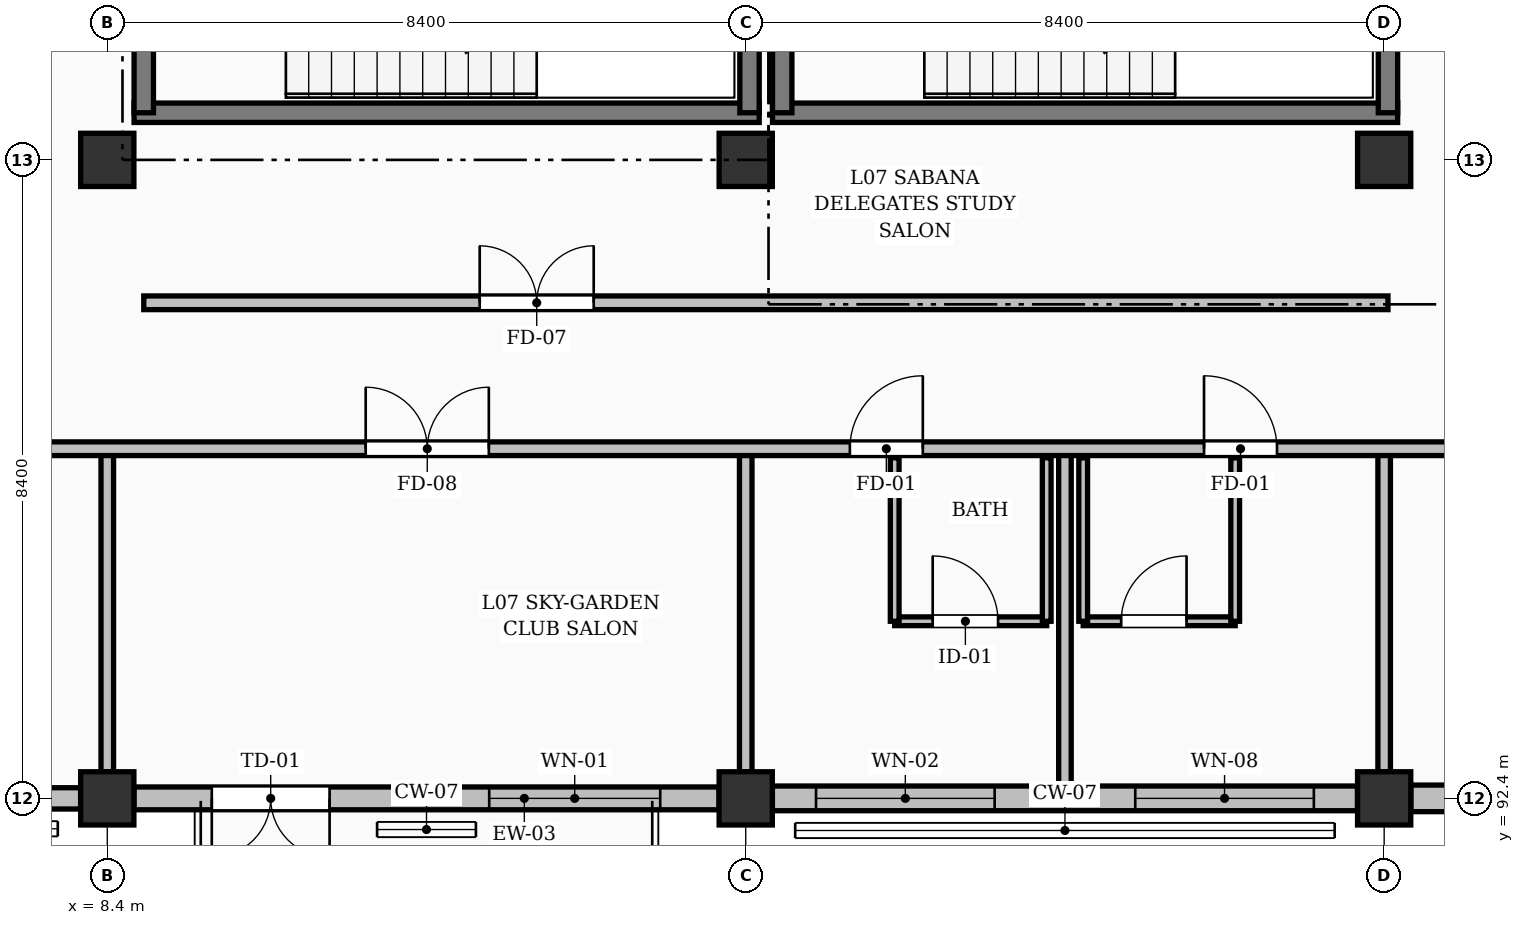
"""IFC4 building model, lengths in metres.
Left out: names, types, materials, properties, quantities, classifications, styles, units other than length and angle.
Written with IfcOpenShell. Run it as: python <this file> out.ifc"""

import sys

from ifc_helpers import new_model, si_unit, direction, frame, frame_2d, origin, origin_2d, place, context, subcontext, project, spatial, rectangle, extrude, element, fill, save


model = new_model("IFC4")
c1 = context("Model", 3, precision=1e-05, world=origin(), true_north=direction((0.0, 1.0)))
c2 = subcontext(c1, "Body", "Model", "MODEL_VIEW")
j1 = project(units=[si_unit("LENGTHUNIT", "METRE"), si_unit("PLANEANGLEUNIT", "RADIAN")], contexts=[c1])
p1 = place(None, origin())
s1 = spatial("IfcSite", under=j1, at=p1, CompositionType="ELEMENT")
p2 = place(p1, origin())
s2 = spatial("IfcBuilding", under=s1, at=p2, CompositionType="ELEMENT")
p3 = place(p2, frame((0.0, 0.0, 25.2)))
s3 = spatial("IfcBuildingStorey", under=s2, at=p3, CompositionType="ELEMENT", Elevation=25.2)
for number, where, z_axis, x_axis in (
    (1, (8.4, 92.4, 0.0), (0.0, 0.0, 1.0), (1.0, 0.0, 0.0)),
    (2, (8.4, 100.8, 0.0), (0.0, 0.0, 1.0), (1.0, 0.0, 0.0)),
    (3, (16.8, 92.4, 0.0), (0.0, 0.0, 1.0), (1.0, 0.0, 0.0)),
    (4, (16.8, 100.8, 0.0), (0.0, 0.0, 1.0), (1.0, 0.0, 0.0)),
    (5, (25.2, 92.4, 0.0), (0.0, 0.0, 1.0), (1.0, 0.0, 0.0)),
    (6, (25.2, 100.8, 0.0), (0.0, 0.0, 1.0), (1.0, 0.0, 0.0)),
):
    element("IfcColumn", number, at=place(p3, frame(where, z_axis=z_axis, x_axis=x_axis)), inside=s3, PredefinedType="COLUMN", context=c2, shape_type="SweptSolid", body=[
        extrude(rectangle(XDim=0.7, YDim=0.7, at=origin_2d()), origin(), (0.0, 0.0, 1.0), 3.36),
    ])
p4 = place(p3, frame((0.351, 92.4, 0.0), z_axis=(0.0, 0.0, 1.0), x_axis=(1.0, 0.0, 0.0)))
e7 = element("IfcWall", 7, at=p4, inside=s3, PredefinedType="SOLIDWALL", context=c2, shape_type="SweptSolid", body=[
    extrude(rectangle(XDim=7.698, YDim=0.28, at=frame_2d((3.849, 0.0))), origin(), (0.0, 0.0, 1.0), 2.414),
])
p5 = place(p4, frame((0.574, 0.0, 0.25)))
e8 = element("IfcOpeningElement", 8, at=p5, cuts=e7, PredefinedType="OPENING", context=c2, shape_type="SweptSolid", body=[
    extrude(rectangle(XDim=2.35, YDim=1.85, at=frame_2d((1.175, 0.925))), frame((0.0, 0.15, 0.0), z_axis=(0.0, -1.0, 0.0), x_axis=(1.0, 0.0, 0.0)), (0.0, 0.0, 1.0), 0.3),
])
p6 = place(p4, frame((4.774, 0.0, 0.25)))
e9 = element("IfcOpeningElement", 9, at=p6, cuts=e7, PredefinedType="OPENING", context=c2, shape_type="SweptSolid", body=[
    extrude(rectangle(XDim=2.35, YDim=1.95, at=frame_2d((1.175, 0.975))), frame((0.0, 0.15, 0.0), z_axis=(0.0, -1.0, 0.0), x_axis=(1.0, 0.0, 0.0)), (0.0, 0.0, 1.0), 0.3),
])
p7 = place(p3, frame((8.751, 92.4, 0.0), z_axis=(0.0, 0.0, 1.0), x_axis=(1.0, 0.0, 0.0)))
e10 = element("IfcWall", 10, at=p7, inside=s3, PredefinedType="SOLIDWALL", context=c2, shape_type="SweptSolid", body=[
    extrude(rectangle(XDim=7.698, YDim=0.3, at=frame_2d((3.849, 0.0))), origin(), (0.0, 0.0, 1.0), 2.494),
])
p8 = place(p7, frame((1.024, 0.0, 0.0)))
e11 = element("IfcOpeningElement", 11, at=p8, cuts=e10, PredefinedType="OPENING", context=c2, shape_type="SweptSolid", body=[
    extrude(rectangle(XDim=1.55, YDim=2.08, at=frame_2d((0.775, 1.04))), frame((0.0, 0.16, 0.0), z_axis=(0.0, -1.0, 0.0), x_axis=(1.0, 0.0, 0.0)), (0.0, 0.0, 1.0), 0.32),
])
p9 = place(p7, frame((4.674, 0.0, 0.25)))
e12 = element("IfcOpeningElement", 12, at=p9, cuts=e10, PredefinedType="OPENING", context=c2, shape_type="SweptSolid", body=[
    extrude(rectangle(XDim=2.25, YDim=1.85, at=frame_2d((1.125, 0.925))), frame((0.0, 0.16, 0.0), z_axis=(0.0, -1.0, 0.0), x_axis=(1.0, 0.0, 0.0)), (0.0, 0.0, 1.0), 0.32),
])
p10 = place(p3, frame((17.151, 92.4, 0.0), z_axis=(0.0, 0.0, 1.0), x_axis=(1.0, 0.0, 0.0)))
e13 = element("IfcWall", 13, at=p10, inside=s3, PredefinedType="SOLIDWALL", context=c2, shape_type="SweptSolid", body=[
    extrude(rectangle(XDim=7.698, YDim=0.325, at=frame_2d((3.849, 0.0))), origin(), (0.0, 0.0, 1.0), 2.494),
])
p11 = place(p10, frame((0.574, 0.0, 0.25)))
e14 = element("IfcOpeningElement", 14, at=p11, cuts=e13, PredefinedType="OPENING", context=c2, shape_type="SweptSolid", body=[
    extrude(rectangle(XDim=2.35, YDim=1.85, at=frame_2d((1.175, 0.925))), frame((0.0, 0.172, 0.0), z_axis=(0.0, -1.0, 0.0), x_axis=(1.0, 0.0, 0.0)), (0.0, 0.0, 1.0), 0.345),
])
p12 = place(p10, frame((4.774, 0.0, 0.25)))
e15 = element("IfcOpeningElement", 15, at=p12, cuts=e13, PredefinedType="OPENING", context=c2, shape_type="SweptSolid", body=[
    extrude(rectangle(XDim=2.35, YDim=1.95, at=frame_2d((1.175, 0.975))), frame((0.0, 0.172, 0.0), z_axis=(0.0, -1.0, 0.0), x_axis=(1.0, 0.0, 0.0)), (0.0, 0.0, 1.0), 0.345),
])
p13 = place(p3, frame((25.551, 92.4, 0.0), z_axis=(0.0, 0.0, 1.0), x_axis=(1.0, 0.0, 0.0)))
e16 = element("IfcWall", 16, at=p13, inside=s3, PredefinedType="SOLIDWALL", context=c2, shape_type="SweptSolid", body=[
    extrude(rectangle(XDim=7.698, YDim=0.35, at=frame_2d((3.849, 0.0))), origin(), (0.0, 0.0, 1.0), 2.494),
])
p14 = place(p13, frame((0.974, 0.0, 0.0)))
e17 = element("IfcOpeningElement", 17, at=p14, cuts=e16, PredefinedType="OPENING", context=c2, shape_type="SweptSolid", body=[
    extrude(rectangle(XDim=1.65, YDim=2.08, at=frame_2d((0.825, 1.04))), frame((0.0, 0.185, 0.0), z_axis=(0.0, -1.0, 0.0), x_axis=(1.0, 0.0, 0.0)), (0.0, 0.0, 1.0), 0.37),
])
p15 = place(p13, frame((4.624, 0.0, 0.25)))
e18 = element("IfcOpeningElement", 18, at=p15, cuts=e16, PredefinedType="OPENING", context=c2, shape_type="SweptSolid", body=[
    extrude(rectangle(XDim=2.35, YDim=1.95, at=frame_2d((1.175, 0.975))), frame((0.0, 0.185, 0.0), z_axis=(0.0, -1.0, 0.0), x_axis=(1.0, 0.0, 0.0)), (0.0, 0.0, 1.0), 0.37),
])
p16 = place(p3, frame((8.752, 101.42, 0.0), z_axis=(0.0, 0.0, 1.0), x_axis=(1.0, 0.0, 0.0)))
e19 = element("IfcWall", 19, at=p16, inside=s3, PredefinedType="SOLIDWALL", context=c2, shape_type="SweptSolid", body=[
    extrude(rectangle(XDim=8.225, YDim=0.255, at=frame_2d((4.113, 0.0))), origin(), (0.0, 0.0, 1.0), 3.12),
])
for number, where, z_axis, x_axis in (
    (20, (8.88, 101.42, 0.0), (0.0, 0.0, 1.0), (0.0, 1.0, 0.0)),
    (21, (16.85, 101.42, 0.0), (0.0, 0.0, 1.0), (0.0, 1.0, 0.0)),
):
    element("IfcWall", number, at=place(p3, frame(where, z_axis=z_axis, x_axis=x_axis)), inside=s3, PredefinedType="SOLIDWALL", context=c2, shape_type="SweptSolid", body=[
        extrude(rectangle(XDim=3.73, YDim=0.255, at=frame_2d((1.865, 0.0))), origin(), (0.0, 0.0, 1.0), 3.12),
    ])
p17 = place(p3, frame((17.153, 101.42, 0.0), z_axis=(0.0, 0.0, 1.0), x_axis=(1.0, 0.0, 0.0)))
e22 = element("IfcWall", 22, at=p17, inside=s3, PredefinedType="SOLIDWALL", context=c2, shape_type="SweptSolid", body=[
    extrude(rectangle(XDim=8.225, YDim=0.255, at=frame_2d((4.112, 0.0))), origin(), (0.0, 0.0, 1.0), 3.12),
])
for number, where, z_axis, x_axis in (
    (23, (17.28, 101.42, 0.0), (0.0, 0.0, 1.0), (0.0, 1.0, 0.0)),
    (24, (25.25, 101.42, 0.0), (0.0, 0.0, 1.0), (0.0, 1.0, 0.0)),
):
    element("IfcWall", number, at=place(p3, frame(where, z_axis=z_axis, x_axis=x_axis)), inside=s3, PredefinedType="SOLIDWALL", context=c2, shape_type="SweptSolid", body=[
        extrude(rectangle(XDim=3.73, YDim=0.255, at=frame_2d((1.865, 0.0))), origin(), (0.0, 0.0, 1.0), 3.12),
    ])
p18 = place(p3, frame((8.4, 92.75, 0.0), z_axis=(0.0, 0.0, 1.0), x_axis=(0.0, 1.0, 0.0)))
e25 = element("IfcWall", 25, at=p18, inside=s3, PredefinedType="PARTITIONING", context=c2, shape_type="SweptSolid", body=[
    extrude(rectangle(XDim=4.25, YDim=0.165, at=frame_2d((2.125, 0.0))), origin(), (0.0, 0.0, 1.0), 2.375),
])
p19 = place(p3, frame((18.76, 94.73, 0.0), z_axis=(0.0, 0.0, 1.0), x_axis=(1.0, 0.0, 0.0)))
e26 = element("IfcWall", 26, at=p19, inside=s3, PredefinedType="PARTITIONING", context=c2, shape_type="SweptSolid", body=[
    extrude(rectangle(XDim=2.0, YDim=0.115, at=frame_2d((1.0, 0.0))), origin(), (0.0, 0.0, 1.0), 3.12),
])
p20 = place(p19, frame((0.5, 0.0, 0.0)))
e27 = element("IfcOpeningElement", 27, at=p20, cuts=e26, PredefinedType="OPENING", context=c2, shape_type="SweptSolid", body=[
    extrude(rectangle(XDim=0.86, YDim=2.05, at=frame_2d((0.43, 1.025))), frame((0.0, 0.067, 0.0), z_axis=(0.0, -1.0, 0.0), x_axis=(1.0, 0.0, 0.0)), (0.0, 0.0, 1.0), 0.135),
])
for number, where, z_axis, x_axis in (
    (28, (18.76, 94.73, 0.0), (0.0, 0.0, 1.0), (0.0, 1.0, 0.0)),
    (29, (20.76, 94.73, 0.0), (0.0, 0.0, 1.0), (0.0, 1.0, 0.0)),
):
    element("IfcWall", number, at=place(p3, frame(where, z_axis=z_axis, x_axis=x_axis)), inside=s3, PredefinedType="PARTITIONING", context=c2, shape_type="SweptSolid", body=[
        extrude(rectangle(XDim=2.15, YDim=0.115, at=frame_2d((1.075, 0.0))), origin(), (0.0, 0.0, 1.0), 3.12),
    ])
p21 = place(p3, frame((21.24, 94.73, 0.0), z_axis=(0.0, 0.0, 1.0), x_axis=(1.0, 0.0, 0.0)))
e30 = element("IfcWall", 30, at=p21, inside=s3, PredefinedType="PARTITIONING", context=c2, shape_type="SweptSolid", body=[
    extrude(rectangle(XDim=2.0, YDim=0.115, at=frame_2d((1.0, 0.0))), origin(), (0.0, 0.0, 1.0), 3.12),
])
p22 = place(p21, frame((0.5, 0.0, 0.0)))
e31 = element("IfcOpeningElement", 31, at=p22, cuts=e30, PredefinedType="OPENING", context=c2, shape_type="SweptSolid", body=[
    extrude(rectangle(XDim=0.86, YDim=2.05, at=frame_2d((0.43, 1.025))), frame((0.0, 0.067, 0.0), z_axis=(0.0, -1.0, 0.0), x_axis=(1.0, 0.0, 0.0)), (0.0, 0.0, 1.0), 0.135),
])
for number, where, z_axis, x_axis in (
    (32, (21.24, 94.73, 0.0), (0.0, 0.0, 1.0), (0.0, 1.0, 0.0)),
    (33, (23.24, 94.73, 0.0), (0.0, 0.0, 1.0), (0.0, 1.0, 0.0)),
):
    element("IfcWall", number, at=place(p3, frame(where, z_axis=z_axis, x_axis=x_axis)), inside=s3, PredefinedType="PARTITIONING", context=c2, shape_type="SweptSolid", body=[
        extrude(rectangle(XDim=2.15, YDim=0.115, at=frame_2d((1.075, 0.0))), origin(), (0.0, 0.0, 1.0), 3.12),
    ])
p23 = place(p3, frame((21.0, 92.562, 0.0), z_axis=(0.0, 0.0, 1.0), x_axis=(0.0, 1.0, 0.0)))
e34 = element("IfcWall", 34, at=p23, inside=s3, PredefinedType="PARTITIONING", context=c2, shape_type="SweptSolid", body=[
    extrude(rectangle(XDim=4.438, YDim=0.165, at=frame_2d((2.219, 0.0))), origin(), (0.0, 0.0, 1.0), 3.12),
])
for number, where, z_axis, x_axis in (
    (35, (16.8, 92.75, 0.0), (0.0, 0.0, 1.0), (0.0, 1.0, 0.0)),
    (36, (25.2, 92.75, 0.0), (0.0, 0.0, 1.0), (0.0, 1.0, 0.0)),
):
    element("IfcWall", number, at=place(p3, frame(where, z_axis=z_axis, x_axis=x_axis)), inside=s3, PredefinedType="PARTITIONING", context=c2, shape_type="SweptSolid", body=[
        extrude(rectangle(XDim=4.25, YDim=0.165, at=frame_2d((2.125, 0.0))), origin(), (0.0, 0.0, 1.0), 2.455),
    ])
p24 = place(p3, frame((0.14, 97.0, 0.0), z_axis=(0.0, 0.0, 1.0), x_axis=(1.0, 0.0, 0.0)))
e37 = element("IfcWall", 37, at=p24, inside=s3, PredefinedType="PARTITIONING", context=c2, shape_type="SweptSolid", body=[
    extrude(rectangle(XDim=50.26, YDim=0.18, at=frame_2d((25.13, 0.0))), origin(), (0.0, 0.0, 1.0), 3.12),
])
p25 = place(p24, frame((1.23, 0.0, 0.0)))
e38 = element("IfcOpeningElement", 38, at=p25, cuts=e37, PredefinedType="OPENING", context=c2, shape_type="SweptSolid", body=[
    extrude(rectangle(XDim=0.96, YDim=2.15, at=frame_2d((0.48, 1.075))), frame((0.0, 0.1, 0.0), z_axis=(0.0, -1.0, 0.0), x_axis=(1.0, 0.0, 0.0)), (0.0, 0.0, 1.0), 0.2),
])
p26 = place(p24, frame((5.89, 0.0, 0.0)))
e39 = element("IfcOpeningElement", 39, at=p26, cuts=e37, PredefinedType="OPENING", context=c2, shape_type="SweptSolid", body=[
    extrude(rectangle(XDim=0.96, YDim=2.15, at=frame_2d((0.48, 1.075))), frame((0.0, 0.1, 0.0), z_axis=(0.0, -1.0, 0.0), x_axis=(1.0, 0.0, 0.0)), (0.0, 0.0, 1.0), 0.2),
])
p27 = place(p24, frame((11.66, 0.0, 0.0)))
e40 = element("IfcOpeningElement", 40, at=p27, cuts=e37, PredefinedType="OPENING", context=c2, shape_type="SweptSolid", body=[
    extrude(rectangle(XDim=1.62, YDim=2.2, at=frame_2d((0.81, 1.1))), frame((0.0, 0.1, 0.0), z_axis=(0.0, -1.0, 0.0), x_axis=(1.0, 0.0, 0.0)), (0.0, 0.0, 1.0), 0.2),
])
p28 = place(p24, frame((18.03, 0.0, 0.0)))
e41 = element("IfcOpeningElement", 41, at=p28, cuts=e37, PredefinedType="OPENING", context=c2, shape_type="SweptSolid", body=[
    extrude(rectangle(XDim=0.96, YDim=2.15, at=frame_2d((0.48, 1.075))), frame((0.0, 0.1, 0.0), z_axis=(0.0, -1.0, 0.0), x_axis=(1.0, 0.0, 0.0)), (0.0, 0.0, 1.0), 0.2),
])
p29 = place(p24, frame((22.69, 0.0, 0.0)))
e42 = element("IfcOpeningElement", 42, at=p29, cuts=e37, PredefinedType="OPENING", context=c2, shape_type="SweptSolid", body=[
    extrude(rectangle(XDim=0.96, YDim=2.15, at=frame_2d((0.48, 1.075))), frame((0.0, 0.1, 0.0), z_axis=(0.0, -1.0, 0.0), x_axis=(1.0, 0.0, 0.0)), (0.0, 0.0, 1.0), 0.2),
])
p30 = place(p24, frame((26.43, 0.0, 0.0)))
e43 = element("IfcOpeningElement", 43, at=p30, cuts=e37, PredefinedType="OPENING", context=c2, shape_type="SweptSolid", body=[
    extrude(rectangle(XDim=0.96, YDim=2.15, at=frame_2d((0.48, 1.075))), frame((0.0, 0.1, 0.0), z_axis=(0.0, -1.0, 0.0), x_axis=(1.0, 0.0, 0.0)), (0.0, 0.0, 1.0), 0.2),
])
p31 = place(p24, frame((31.09, 0.0, 0.0)))
e44 = element("IfcOpeningElement", 44, at=p31, cuts=e37, PredefinedType="OPENING", context=c2, shape_type="SweptSolid", body=[
    extrude(rectangle(XDim=0.96, YDim=2.15, at=frame_2d((0.48, 1.075))), frame((0.0, 0.1, 0.0), z_axis=(0.0, -1.0, 0.0), x_axis=(1.0, 0.0, 0.0)), (0.0, 0.0, 1.0), 0.2),
])
p32 = place(p24, frame((34.83, 0.0, 0.0)))
e45 = element("IfcOpeningElement", 45, at=p32, cuts=e37, PredefinedType="OPENING", context=c2, shape_type="SweptSolid", body=[
    extrude(rectangle(XDim=0.96, YDim=2.15, at=frame_2d((0.48, 1.075))), frame((0.0, 0.1, 0.0), z_axis=(0.0, -1.0, 0.0), x_axis=(1.0, 0.0, 0.0)), (0.0, 0.0, 1.0), 0.2),
])
p33 = place(p24, frame((39.49, 0.0, 0.0)))
e46 = element("IfcOpeningElement", 46, at=p33, cuts=e37, PredefinedType="OPENING", context=c2, shape_type="SweptSolid", body=[
    extrude(rectangle(XDim=0.96, YDim=2.15, at=frame_2d((0.48, 1.075))), frame((0.0, 0.1, 0.0), z_axis=(0.0, -1.0, 0.0), x_axis=(1.0, 0.0, 0.0)), (0.0, 0.0, 1.0), 0.2),
])
p34 = place(p24, frame((43.23, 0.0, 0.0)))
e47 = element("IfcOpeningElement", 47, at=p34, cuts=e37, PredefinedType="OPENING", context=c2, shape_type="SweptSolid", body=[
    extrude(rectangle(XDim=0.96, YDim=2.15, at=frame_2d((0.48, 1.075))), frame((0.0, 0.1, 0.0), z_axis=(0.0, -1.0, 0.0), x_axis=(1.0, 0.0, 0.0)), (0.0, 0.0, 1.0), 0.2),
])
p35 = place(p24, frame((47.89, 0.0, 0.0)))
e48 = element("IfcOpeningElement", 48, at=p35, cuts=e37, PredefinedType="OPENING", context=c2, shape_type="SweptSolid", body=[
    extrude(rectangle(XDim=0.96, YDim=2.15, at=frame_2d((0.48, 1.075))), frame((0.0, 0.1, 0.0), z_axis=(0.0, -1.0, 0.0), x_axis=(1.0, 0.0, 0.0)), (0.0, 0.0, 1.0), 0.2),
])
p36 = place(p3, frame((8.88, 98.92, 0.0), z_axis=(0.0, 0.0, 1.0), x_axis=(1.0, 0.0, 0.0)))
e49 = element("IfcWall", 49, at=p36, inside=s3, PredefinedType="PARTITIONING", context=c2, shape_type="SweptSolid", body=[
    extrude(rectangle(XDim=16.37, YDim=0.18, at=frame_2d((8.185, 0.0))), origin(), (0.0, 0.0, 1.0), 3.12),
])
p37 = place(p36, frame((4.42, 0.0, 0.0)))
e50 = element("IfcOpeningElement", 50, at=p37, cuts=e49, PredefinedType="OPENING", context=c2, shape_type="SweptSolid", body=[
    extrude(rectangle(XDim=1.5, YDim=2.2, at=frame_2d((0.75, 1.1))), frame((0.0, 0.1, 0.0), z_axis=(0.0, -1.0, 0.0), x_axis=(1.0, 0.0, 0.0)), (0.0, 0.0, 1.0), 0.2),
])
p38 = place(p8, frame((1.55, 0.0, 0.0), z_axis=(0.0, 0.0, 1.0), x_axis=(-1.0, 0.0, 0.0)))
e51 = element("IfcDoor", 51, at=p38, inside=s3, OperationType="DOUBLE_DOOR_SINGLE_SWING", PredefinedType="DOOR", context=c2, shape_type="SweptSolid", body=[
    extrude(rectangle(XDim=1.55, YDim=2.08, at=frame_2d((0.775, 1.04))), frame((0.0, 0.025, 0.0), z_axis=(0.0, -1.0, 0.0), x_axis=(1.0, 0.0, 0.0)), (0.0, 0.0, 1.0), 0.05),
])
fill(e11, e51)
p39 = place(p9, origin())
e52 = element("IfcWindow", 52, at=p39, inside=s3, PartitioningType="DOUBLE_PANEL_VERTICAL", PredefinedType="WINDOW", context=c2, shape_type="SweptSolid", body=[
    extrude(rectangle(XDim=2.25, YDim=1.85, at=frame_2d((1.125, 0.925))), frame((0.0, 0.03, 0.0), z_axis=(0.0, -1.0, 0.0), x_axis=(1.0, 0.0, 0.0)), (0.0, 0.0, 1.0), 0.06),
])
fill(e12, e52)
p40 = place(p11, origin())
e53 = element("IfcWindow", 53, at=p40, inside=s3, PartitioningType="DOUBLE_PANEL_VERTICAL", PredefinedType="WINDOW", context=c2, shape_type="SweptSolid", body=[
    extrude(rectangle(XDim=2.35, YDim=1.85, at=frame_2d((1.175, 0.925))), frame((0.0, 0.03, 0.0), z_axis=(0.0, -1.0, 0.0), x_axis=(1.0, 0.0, 0.0)), (0.0, 0.0, 1.0), 0.06),
])
fill(e14, e53)
p41 = place(p12, origin())
e54 = element("IfcWindow", 54, at=p41, inside=s3, PartitioningType="DOUBLE_PANEL_VERTICAL", PredefinedType="WINDOW", context=c2, shape_type="SweptSolid", body=[
    extrude(rectangle(XDim=2.35, YDim=1.95, at=frame_2d((1.175, 0.975))), frame((0.0, 0.03, 0.0), z_axis=(0.0, -1.0, 0.0), x_axis=(1.0, 0.0, 0.0)), (0.0, 0.0, 1.0), 0.06),
])
fill(e15, e54)
p42 = place(p20, origin())
e55 = element("IfcDoor", 55, at=p42, inside=s3, OperationType="SINGLE_SWING_LEFT", PredefinedType="DOOR", context=c2, shape_type="SweptSolid", body=[
    extrude(rectangle(XDim=0.86, YDim=2.05, at=frame_2d((0.43, 1.025))), frame((0.0, 0.025, 0.0), z_axis=(0.0, -1.0, 0.0), x_axis=(1.0, 0.0, 0.0)), (0.0, 0.0, 1.0), 0.05),
])
fill(e27, e55)
p43 = place(p22, origin())
e56 = element("IfcDoor", 56, at=p43, inside=s3, OperationType="SINGLE_SWING_RIGHT", PredefinedType="DOOR", context=c2, shape_type="SweptSolid", body=[
    extrude(rectangle(XDim=0.86, YDim=2.05, at=frame_2d((0.43, 1.025))), frame((0.0, 0.025, 0.0), z_axis=(0.0, -1.0, 0.0), x_axis=(1.0, 0.0, 0.0)), (0.0, 0.0, 1.0), 0.05),
])
fill(e31, e56)
p44 = place(p27, origin())
e57 = element("IfcDoor", 57, at=p44, inside=s3, OperationType="DOUBLE_DOOR_SINGLE_SWING", PredefinedType="DOOR", context=c2, shape_type="SweptSolid", body=[
    extrude(rectangle(XDim=1.62, YDim=2.2, at=frame_2d((0.81, 1.1))), frame((0.0, 0.025, 0.0), z_axis=(0.0, -1.0, 0.0), x_axis=(1.0, 0.0, 0.0)), (0.0, 0.0, 1.0), 0.05),
])
fill(e40, e57)
p45 = place(p28, origin())
e58 = element("IfcDoor", 58, at=p45, inside=s3, OperationType="SINGLE_SWING_RIGHT", PredefinedType="DOOR", context=c2, shape_type="SweptSolid", body=[
    extrude(rectangle(XDim=0.96, YDim=2.15, at=frame_2d((0.48, 1.075))), frame((0.0, 0.025, 0.0), z_axis=(0.0, -1.0, 0.0), x_axis=(1.0, 0.0, 0.0)), (0.0, 0.0, 1.0), 0.05),
])
fill(e41, e58)
p46 = place(p29, origin())
e59 = element("IfcDoor", 59, at=p46, inside=s3, OperationType="SINGLE_SWING_LEFT", PredefinedType="DOOR", context=c2, shape_type="SweptSolid", body=[
    extrude(rectangle(XDim=0.96, YDim=2.15, at=frame_2d((0.48, 1.075))), frame((0.0, 0.025, 0.0), z_axis=(0.0, -1.0, 0.0), x_axis=(1.0, 0.0, 0.0)), (0.0, 0.0, 1.0), 0.05),
])
fill(e42, e59)
p47 = place(p37, origin())
e60 = element("IfcDoor", 60, at=p47, inside=s3, OperationType="DOUBLE_DOOR_SINGLE_SWING", PredefinedType="DOOR", context=c2, shape_type="SweptSolid", body=[
    extrude(rectangle(XDim=1.5, YDim=2.2, at=frame_2d((0.75, 1.1))), frame((0.0, 0.025, 0.0), z_axis=(0.0, -1.0, 0.0), x_axis=(1.0, 0.0, 0.0)), (0.0, 0.0, 1.0), 0.05),
])
fill(e50, e60)
save(model, sys.argv[1])
